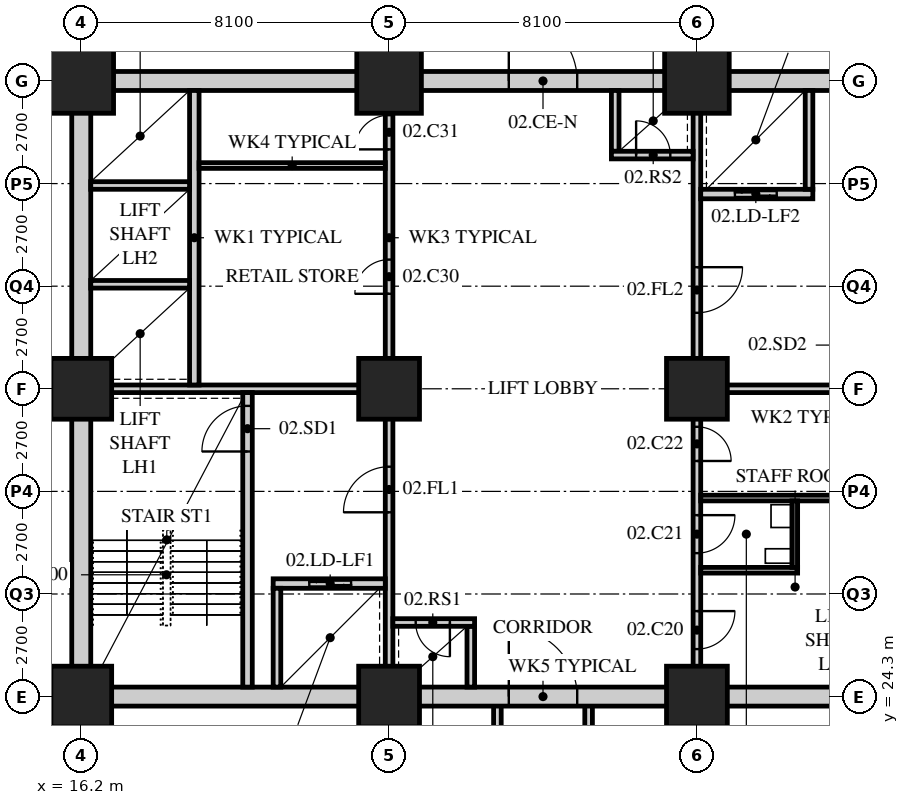
"""IFC4 building model, lengths in metres.
Left out: names, types, materials, properties, quantities, classifications, styles, units other than length and angle.
Written with IfcOpenShell. Run it as: python <this file> out.ifc"""

import sys

from ifc_helpers import new_model, si_unit, direction, frame, frame_2d, origin, origin_2d, place, context, subcontext, project, spatial, rectangle, hollow_rectangle, extrude, element, fill, save


model = new_model("IFC4")
c1 = context("Model", 3, precision=1e-05, world=origin(), true_north=direction((0.0, 1.0)))
c2 = subcontext(c1, "Body", "Model", "MODEL_VIEW")
j1 = project(units=[si_unit("LENGTHUNIT", "METRE"), si_unit("PLANEANGLEUNIT", "RADIAN")], contexts=[c1])
p1 = place(None, origin())
s1 = spatial("IfcSite", under=j1, at=p1, CompositionType="ELEMENT")
p2 = place(p1, origin())
s2 = spatial("IfcBuilding", under=s1, at=p2, CompositionType="ELEMENT")
p3 = place(p2, frame((0.0, 0.0, 11.4)))
s3 = spatial("IfcBuildingStorey", under=s2, at=p3, CompositionType="ELEMENT", Elevation=11.4)
for number, where, z_axis, x_axis in (
    (1, (16.2, 24.3, 0.0), (0.0, 0.0, 1.0), (1.0, 0.0, 0.0)),
    (2, (16.2, 32.4, 0.0), (0.0, 0.0, 1.0), (1.0, 0.0, 0.0)),
):
    element("IfcColumn", number, at=place(p3, frame(where, z_axis=z_axis, x_axis=x_axis)), inside=s3, PredefinedType="COLUMN", context=c2, shape_type="SweptSolid", body=[
        extrude(hollow_rectangle(XDim=1.6, YDim=1.6, WallThickness=0.15, at=origin_2d()), origin(), (0.0, 0.0, 1.0), 5.4),
    ])
p4 = place(p3, frame((16.2, 40.5, 0.0), z_axis=(0.0, 0.0, 1.0), x_axis=(1.0, 0.0, 0.0)))
e3 = element("IfcColumn", 3, at=p4, inside=s3, PredefinedType="COLUMN", context=c2, shape_type="SweptSolid", body=[
    extrude(hollow_rectangle(XDim=1.7, YDim=1.7, WallThickness=0.16, at=origin_2d()), origin(), (0.0, 0.0, 1.0), 5.4),
])
for number, where, z_axis, x_axis in (
    (4, (24.3, 24.3, 0.0), (0.0, 0.0, 1.0), (1.0, 0.0, 0.0)),
    (5, (24.3, 32.4, 0.0), (0.0, 0.0, 1.0), (1.0, 0.0, 0.0)),
):
    element("IfcColumn", number, at=place(p3, frame(where, z_axis=z_axis, x_axis=x_axis)), inside=s3, PredefinedType="COLUMN", context=c2, shape_type="SweptSolid", body=[
        extrude(hollow_rectangle(XDim=1.6, YDim=1.6, WallThickness=0.15, at=origin_2d()), origin(), (0.0, 0.0, 1.0), 5.4),
    ])
p5 = place(p3, frame((24.3, 40.5, 0.0), z_axis=(0.0, 0.0, 1.0), x_axis=(1.0, 0.0, 0.0)))
e6 = element("IfcColumn", 6, at=p5, inside=s3, PredefinedType="COLUMN", context=c2, shape_type="SweptSolid", body=[
    extrude(hollow_rectangle(XDim=1.7, YDim=1.7, WallThickness=0.16, at=origin_2d()), origin(), (0.0, 0.0, 1.0), 5.4),
])
for number, where, z_axis, x_axis in (
    (7, (32.4, 24.3, 0.0), (0.0, 0.0, 1.0), (1.0, 0.0, 0.0)),
    (8, (32.4, 32.4, 0.0), (0.0, 0.0, 1.0), (1.0, 0.0, 0.0)),
):
    element("IfcColumn", number, at=place(p3, frame(where, z_axis=z_axis, x_axis=x_axis)), inside=s3, PredefinedType="COLUMN", context=c2, shape_type="SweptSolid", body=[
        extrude(hollow_rectangle(XDim=1.6, YDim=1.6, WallThickness=0.15, at=origin_2d()), origin(), (0.0, 0.0, 1.0), 5.4),
    ])
p6 = place(p3, frame((32.4, 40.5, 0.0), z_axis=(0.0, 0.0, 1.0), x_axis=(1.0, 0.0, 0.0)))
e9 = element("IfcColumn", 9, at=p6, inside=s3, PredefinedType="COLUMN", context=c2, shape_type="SweptSolid", body=[
    extrude(hollow_rectangle(XDim=1.7, YDim=1.7, WallThickness=0.16, at=origin_2d()), origin(), (0.0, 0.0, 1.0), 5.4),
])
p7 = place(p3, frame((16.0, 40.5, 0.0), z_axis=(0.0, 0.0, 1.0), x_axis=(-1.0, 0.0, 0.0)))
e10 = element("IfcWall", 10, at=p7, inside=s3, PredefinedType="PARTITIONING", context=c2, shape_type="SweptSolid", body=[
    extrude(rectangle(XDim=12.4, YDim=0.15, at=frame_2d((6.2, 0.0))), origin(), (0.0, 0.0, 1.0), 4.538),
])
p8 = place(p3, frame((3.6, 32.4, 0.0), z_axis=(0.0, 0.0, 1.0), x_axis=(1.0, 0.0, 0.0)))
e11 = element("IfcWall", 11, at=p8, inside=s3, PredefinedType="SOLIDWALL", context=c2, shape_type="SweptSolid", body=[
    extrude(rectangle(XDim=12.6, YDim=0.2, at=frame_2d((6.3, 0.0))), origin(), (0.0, 0.0, 1.0), 4.538),
])
for number, where, z_axis, x_axis in (
    (12, (27.15, 11.7, 0.0), (0.0, 0.0, 1.0), (0.0, 1.0, 0.0)),
    (13, (29.55, 11.7, 0.0), (0.0, 0.0, 1.0), (0.0, 1.0, 0.0)),
):
    element("IfcWall", number, at=place(p3, frame(where, z_axis=z_axis, x_axis=x_axis)), inside=s3, PredefinedType="SOLIDWALL", context=c2, shape_type="SweptSolid", body=[
        extrude(rectangle(XDim=12.6, YDim=0.2, at=frame_2d((6.3, 0.0))), origin(), (0.0, 0.0, 1.0), 5.15),
    ])
p9 = place(p3, frame((3.6, 24.35, 0.0), z_axis=(0.0, 0.0, 1.0), x_axis=(1.0, 0.0, 0.0)))
e14 = element("IfcWall", 14, at=p9, inside=s3, PredefinedType="SOLIDWALL", context=c2, shape_type="SweptSolid", body=[
    extrude(rectangle(XDim=12.6, YDim=0.2, at=frame_2d((6.3, 0.0))), origin(), (0.0, 0.0, 1.0), 4.538),
])
p10 = place(p3, frame((15.95, 24.3, 0.0), z_axis=(0.0, 0.0, 1.0), x_axis=(1.0, 0.0, 0.0)))
e15 = element("IfcWall", 15, at=p10, inside=s3, PredefinedType="SOLIDWALL", context=c2, shape_type="SweptSolid", body=[
    extrude(rectangle(XDim=24.8, YDim=0.5, at=frame_2d((12.4, 0.0))), origin(), (0.0, 0.0, 1.0), 4.5),
])
p11 = place(p10, frame((11.5, 0.0, 0.0)))
e16 = element("IfcOpeningElement", 16, at=p11, cuts=e15, PredefinedType="OPENING", context=c2, shape_type="SweptSolid", body=[
    extrude(rectangle(XDim=1.8, YDim=2.4, at=frame_2d((0.9, 1.2))), frame((0.0, 0.26, 0.0), z_axis=(0.0, -1.0, 0.0), x_axis=(1.0, 0.0, 0.0)), (0.0, 0.0, 1.0), 0.52),
])
p12 = place(p3, frame((15.95, 40.5, 0.0), z_axis=(0.0, 0.0, 1.0), x_axis=(1.0, 0.0, 0.0)))
e17 = element("IfcWall", 17, at=p12, inside=s3, PredefinedType="SOLIDWALL", context=c2, shape_type="SweptSolid", body=[
    extrude(rectangle(XDim=24.8, YDim=0.5, at=frame_2d((12.4, 0.0))), origin(), (0.0, 0.0, 1.0), 4.5),
])
p13 = place(p12, frame((11.5, 0.0, 0.0)))
e18 = element("IfcOpeningElement", 18, at=p13, cuts=e17, PredefinedType="OPENING", context=c2, shape_type="SweptSolid", body=[
    extrude(rectangle(XDim=1.8, YDim=2.4, at=frame_2d((0.9, 1.2))), frame((0.0, 0.26, 0.0), z_axis=(0.0, -1.0, 0.0), x_axis=(1.0, 0.0, 0.0)), (0.0, 0.0, 1.0), 0.52),
])
p14 = place(p3, frame((16.2, 24.55, 0.0), z_axis=(0.0, 0.0, 1.0), x_axis=(0.0, 1.0, 0.0)))
e19 = element("IfcWall", 19, at=p14, inside=s3, PredefinedType="SOLIDWALL", context=c2, shape_type="SweptSolid", body=[
    extrude(rectangle(XDim=15.7, YDim=0.5, at=frame_2d((7.85, 0.0))), origin(), (0.0, 0.0, 1.0), 4.538),
])
p15 = place(p3, frame((16.45, 32.4, 0.0), z_axis=(0.0, 0.0, 1.0), x_axis=(1.0, 0.0, 0.0)))
e20 = element("IfcWall", 20, at=p15, inside=s3, PredefinedType="SOLIDWALL", context=c2, shape_type="SweptSolid", body=[
    extrude(rectangle(XDim=7.95, YDim=0.2, at=frame_2d((3.975, 0.0))), origin(), (0.0, 0.0, 1.0), 4.45),
])
p16 = place(p3, frame((24.3, 24.55, 0.0), z_axis=(0.0, 0.0, 1.0), x_axis=(0.0, 1.0, 0.0)))
e21 = element("IfcWall", 21, at=p16, inside=s3, PredefinedType="SOLIDWALL", context=c2, shape_type="SweptSolid", body=[
    extrude(rectangle(XDim=7.75, YDim=0.2, at=frame_2d((3.875, 0.0))), origin(), (0.0, 0.0, 1.0), 4.45),
])
p17 = place(p16, frame((4.6, 0.0, 0.0)))
e22 = element("IfcOpeningElement", 22, at=p17, cuts=e21, PredefinedType="OPENING", context=c2, shape_type="SweptSolid", body=[
    extrude(rectangle(XDim=1.2, YDim=2.1, at=frame_2d((0.6, 1.05))), frame((0.0, 0.11, 0.0), z_axis=(0.0, -1.0, 0.0), x_axis=(1.0, 0.0, 0.0)), (0.0, 0.0, 1.0), 0.22),
])
p18 = place(p3, frame((20.575, 24.55, 0.0), z_axis=(0.0, 0.0, 1.0), x_axis=(0.0, 1.0, 0.0)))
e23 = element("IfcWall", 23, at=p18, inside=s3, PredefinedType="SOLIDWALL", context=c2, shape_type="SweptSolid", body=[
    extrude(rectangle(XDim=7.75, YDim=0.25, at=frame_2d((3.875, 0.0))), origin(), (0.0, 0.0, 1.0), 5.15),
])
p19 = place(p18, frame((6.2, 0.0, 0.0)))
e24 = element("IfcOpeningElement", 24, at=p19, cuts=e23, PredefinedType="OPENING", context=c2, shape_type="SweptSolid", body=[
    extrude(rectangle(XDim=1.2, YDim=2.1, at=frame_2d((0.6, 1.05))), frame((0.0, 0.135, 0.0), z_axis=(0.0, -1.0, 0.0), x_axis=(1.0, 0.0, 0.0)), (0.0, 0.0, 1.0), 0.27),
])
p20 = place(p3, frame((21.25, 27.275, 0.0), z_axis=(0.0, 0.0, 1.0), x_axis=(1.0, 0.0, 0.0)))
e25 = element("IfcWall", 25, at=p20, inside=s3, PredefinedType="SOLIDWALL", context=c2, shape_type="SweptSolid", body=[
    extrude(rectangle(XDim=2.95, YDim=0.25, at=frame_2d((1.475, 0.0))), origin(), (0.0, 0.0, 1.0), 5.15),
])
p21 = place(p20, frame((0.95, 0.0, 0.0)))
e26 = element("IfcOpeningElement", 26, at=p21, cuts=e25, PredefinedType="OPENING", context=c2, shape_type="SweptSolid", body=[
    extrude(rectangle(XDim=1.1, YDim=2.4, at=frame_2d((0.55, 1.2))), frame((0.0, 0.135, 0.0), z_axis=(0.0, -1.0, 0.0), x_axis=(1.0, 0.0, 0.0)), (0.0, 0.0, 1.0), 0.27),
])
p22 = place(p3, frame((21.35, 24.55, 0.0), z_axis=(0.0, 0.0, 1.0), x_axis=(0.0, 1.0, 0.0)))
e27 = element("IfcWall", 27, at=p22, inside=s3, PredefinedType="SOLIDWALL", context=c2, shape_type="SweptSolid", body=[
    extrude(rectangle(XDim=2.6, YDim=0.2, at=frame_2d((1.3, 0.0))), origin(), (0.0, 0.0, 1.0), 5.15),
])
p23 = place(p3, frame((19.175, 32.5, 0.0), z_axis=(0.0, 0.0, 1.0), x_axis=(0.0, 1.0, 0.0)))
e28 = element("IfcWall", 28, at=p23, inside=s3, PredefinedType="SOLIDWALL", context=c2, shape_type="SweptSolid", body=[
    extrude(rectangle(XDim=7.75, YDim=0.25, at=frame_2d((3.875, 0.0))), origin(), (0.0, 0.0, 1.0), 5.15),
])
for number, where, z_axis, x_axis in (
    (29, (16.45, 35.15, 0.0), (0.0, 0.0, 1.0), (1.0, 0.0, 0.0)),
    (30, (16.45, 37.75, 0.0), (0.0, 0.0, 1.0), (1.0, 0.0, 0.0)),
):
    element("IfcWall", number, at=place(p3, frame(where, z_axis=z_axis, x_axis=x_axis)), inside=s3, PredefinedType="SOLIDWALL", context=c2, shape_type="SweptSolid", body=[
        extrude(rectangle(XDim=2.6, YDim=0.2, at=frame_2d((1.3, 0.0))), origin(), (0.0, 0.0, 1.0), 5.15),
    ])
p24 = place(p3, frame((26.45, 24.55, 0.0), z_axis=(0.0, 0.0, 1.0), x_axis=(0.0, 1.0, 0.0)))
e31 = element("IfcWall", 31, at=p24, inside=s3, PredefinedType="SOLIDWALL", context=c2, shape_type="SweptSolid", body=[
    extrude(rectangle(XDim=1.6, YDim=0.2, at=frame_2d((0.8, 0.0))), origin(), (0.0, 0.0, 1.0), 5.15),
])
p25 = place(p3, frame((24.4, 26.25, 0.0), z_axis=(0.0, 0.0, 1.0), x_axis=(1.0, 0.0, 0.0)))
e32 = element("IfcWall", 32, at=p25, inside=s3, PredefinedType="SOLIDWALL", context=c2, shape_type="SweptSolid", body=[
    extrude(rectangle(XDim=2.15, YDim=0.2, at=frame_2d((1.075, 0.0))), origin(), (0.0, 0.0, 1.0), 5.15),
])
p26 = place(p25, frame((0.6, 0.0, 0.0)))
e33 = element("IfcOpeningElement", 33, at=p26, cuts=e32, PredefinedType="OPENING", context=c2, shape_type="SweptSolid", body=[
    extrude(rectangle(XDim=0.9, YDim=2.1, at=frame_2d((0.45, 1.05))), frame((0.0, 0.11, 0.0), z_axis=(0.0, -1.0, 0.0), x_axis=(1.0, 0.0, 0.0)), (0.0, 0.0, 1.0), 0.22),
])
p27 = place(p3, frame((32.3, 32.4, 0.0), z_axis=(0.0, 0.0, 1.0), x_axis=(1.0, 0.0, 0.0)))
e34 = element("IfcWall", 34, at=p27, inside=s3, PredefinedType="SOLIDWALL", context=c2, shape_type="SweptSolid", body=[
    extrude(rectangle(XDim=7.95, YDim=0.2, at=frame_2d((3.975, 0.0))), origin(), (0.0, 0.0, 1.0), 4.45),
])
p28 = place(p3, frame((32.4, 32.5, 0.0), z_axis=(0.0, 0.0, 1.0), x_axis=(0.0, 1.0, 0.0)))
e35 = element("IfcWall", 35, at=p28, inside=s3, PredefinedType="SOLIDWALL", context=c2, shape_type="SweptSolid", body=[
    extrude(rectangle(XDim=7.75, YDim=0.2, at=frame_2d((3.875, 0.0))), origin(), (0.0, 0.0, 1.0), 4.45),
])
p29 = place(p28, frame((1.9, 0.0, 0.0)))
e36 = element("IfcOpeningElement", 36, at=p29, cuts=e35, PredefinedType="OPENING", context=c2, shape_type="SweptSolid", body=[
    extrude(rectangle(XDim=1.2, YDim=2.1, at=frame_2d((0.6, 1.05))), frame((0.0, 0.11, 0.0), z_axis=(0.0, -1.0, 0.0), x_axis=(1.0, 0.0, 0.0)), (0.0, 0.0, 1.0), 0.22),
])
p30 = place(p3, frame((32.5, 37.525, 0.0), z_axis=(0.0, 0.0, 1.0), x_axis=(1.0, 0.0, 0.0)))
e37 = element("IfcWall", 37, at=p30, inside=s3, PredefinedType="SOLIDWALL", context=c2, shape_type="SweptSolid", body=[
    extrude(rectangle(XDim=2.95, YDim=0.25, at=frame_2d((1.475, 0.0))), origin(), (0.0, 0.0, 1.0), 5.15),
])
p31 = place(p30, frame((0.9, 0.0, 0.0)))
e38 = element("IfcOpeningElement", 38, at=p31, cuts=e37, PredefinedType="OPENING", context=c2, shape_type="SweptSolid", body=[
    extrude(rectangle(XDim=1.1, YDim=2.4, at=frame_2d((0.55, 1.2))), frame((0.0, 0.135, 0.0), z_axis=(0.0, -1.0, 0.0), x_axis=(1.0, 0.0, 0.0)), (0.0, 0.0, 1.0), 0.27),
])
p32 = place(p3, frame((35.35, 37.65, 0.0), z_axis=(0.0, 0.0, 1.0), x_axis=(0.0, 1.0, 0.0)))
e39 = element("IfcWall", 39, at=p32, inside=s3, PredefinedType="SOLIDWALL", context=c2, shape_type="SweptSolid", body=[
    extrude(rectangle(XDim=2.6, YDim=0.2, at=frame_2d((1.3, 0.0))), origin(), (0.0, 0.0, 1.0), 5.15),
])
p33 = place(p3, frame((30.25, 38.65, 0.0), z_axis=(0.0, 0.0, 1.0), x_axis=(0.0, 1.0, 0.0)))
e40 = element("IfcWall", 40, at=p33, inside=s3, PredefinedType="SOLIDWALL", context=c2, shape_type="SweptSolid", body=[
    extrude(rectangle(XDim=1.6, YDim=0.2, at=frame_2d((0.8, 0.0))), origin(), (0.0, 0.0, 1.0), 5.15),
])
p34 = place(p3, frame((30.15, 38.55, 0.0), z_axis=(0.0, 0.0, 1.0), x_axis=(1.0, 0.0, 0.0)))
e41 = element("IfcWall", 41, at=p34, inside=s3, PredefinedType="SOLIDWALL", context=c2, shape_type="SweptSolid", body=[
    extrude(rectangle(XDim=2.15, YDim=0.2, at=frame_2d((1.075, 0.0))), origin(), (0.0, 0.0, 1.0), 5.15),
])
p35 = place(p34, frame((0.65, 0.0, 0.0)))
e42 = element("IfcOpeningElement", 42, at=p35, cuts=e41, PredefinedType="OPENING", context=c2, shape_type="SweptSolid", body=[
    extrude(rectangle(XDim=0.9, YDim=2.1, at=frame_2d((0.45, 1.05))), frame((0.0, 0.11, 0.0), z_axis=(0.0, -1.0, 0.0), x_axis=(1.0, 0.0, 0.0)), (0.0, 0.0, 1.0), 0.22),
])
p36 = place(p3, frame((24.3, 32.5, 0.0), z_axis=(0.0, 0.0, 1.0), x_axis=(0.0, 1.0, 0.0)))
e43 = element("IfcWall", 43, at=p36, inside=s3, PredefinedType="PARTITIONING", context=c2, shape_type="SweptSolid", body=[
    extrude(rectangle(XDim=7.75, YDim=0.2, at=frame_2d((3.875, 0.0))), origin(), (0.0, 0.0, 1.0), 4.45),
])
p37 = place(p36, frame((2.4, 0.0, 0.0)))
e44 = element("IfcOpeningElement", 44, at=p37, cuts=e43, PredefinedType="OPENING", context=c2, shape_type="SweptSolid", body=[
    extrude(rectangle(XDim=0.9, YDim=2.1, at=frame_2d((0.45, 1.05))), frame((0.0, 0.11, 0.0), z_axis=(0.0, -1.0, 0.0), x_axis=(1.0, 0.0, 0.0)), (0.0, 0.0, 1.0), 0.22),
])
p38 = place(p36, frame((6.2, 0.0, 0.0)))
e45 = element("IfcOpeningElement", 45, at=p38, cuts=e43, PredefinedType="OPENING", context=c2, shape_type="SweptSolid", body=[
    extrude(rectangle(XDim=0.9, YDim=2.1, at=frame_2d((0.45, 1.05))), frame((0.0, 0.11, 0.0), z_axis=(0.0, -1.0, 0.0), x_axis=(1.0, 0.0, 0.0)), (0.0, 0.0, 1.0), 0.22),
])
p39 = place(p3, frame((19.3, 38.275, 0.0), z_axis=(0.0, 0.0, 1.0), x_axis=(1.0, 0.0, 0.0)))
e46 = element("IfcWall", 46, at=p39, inside=s3, PredefinedType="PARTITIONING", context=c2, shape_type="SweptSolid", body=[
    extrude(rectangle(XDim=4.9, YDim=0.15, at=frame_2d((2.45, 0.0))), origin(), (0.0, 0.0, 1.0), 5.15),
])
p40 = place(p3, frame((32.4, 24.55, 0.0), z_axis=(0.0, 0.0, 1.0), x_axis=(0.0, 1.0, 0.0)))
e47 = element("IfcWall", 47, at=p40, inside=s3, PredefinedType="PARTITIONING", context=c2, shape_type="SweptSolid", body=[
    extrude(rectangle(XDim=7.75, YDim=0.2, at=frame_2d((3.875, 0.0))), origin(), (0.0, 0.0, 1.0), 4.45),
])
p41 = place(p40, frame((1.0, 0.0, 0.0)))
e48 = element("IfcOpeningElement", 48, at=p41, cuts=e47, PredefinedType="OPENING", context=c2, shape_type="SweptSolid", body=[
    extrude(rectangle(XDim=1.0, YDim=2.1, at=frame_2d((0.5, 1.05))), frame((0.0, 0.11, 0.0), z_axis=(0.0, -1.0, 0.0), x_axis=(1.0, 0.0, 0.0)), (0.0, 0.0, 1.0), 0.22),
])
p42 = place(p40, frame((3.525, 0.0, 0.0)))
e49 = element("IfcOpeningElement", 49, at=p42, cuts=e47, PredefinedType="OPENING", context=c2, shape_type="SweptSolid", body=[
    extrude(rectangle(XDim=1.0, YDim=2.1, at=frame_2d((0.5, 1.05))), frame((0.0, 0.11, 0.0), z_axis=(0.0, -1.0, 0.0), x_axis=(1.0, 0.0, 0.0)), (0.0, 0.0, 1.0), 0.22),
])
p43 = place(p40, frame((5.95, 0.0, 0.0)))
e50 = element("IfcOpeningElement", 50, at=p43, cuts=e47, PredefinedType="OPENING", context=c2, shape_type="SweptSolid", body=[
    extrude(rectangle(XDim=0.9, YDim=2.1, at=frame_2d((0.45, 1.05))), frame((0.0, 0.11, 0.0), z_axis=(0.0, -1.0, 0.0), x_axis=(1.0, 0.0, 0.0)), (0.0, 0.0, 1.0), 0.22),
])
p44 = place(p3, frame((32.5, 27.625, 0.0), z_axis=(0.0, 0.0, 1.0), x_axis=(1.0, 0.0, 0.0)))
e51 = element("IfcWall", 51, at=p44, inside=s3, PredefinedType="PARTITIONING", context=c2, shape_type="SweptSolid", body=[
    extrude(rectangle(XDim=2.55, YDim=0.15, at=frame_2d((1.275, 0.0))), origin(), (0.0, 0.0, 1.0), 5.15),
])
p45 = place(p3, frame((32.5, 29.525, 0.0), z_axis=(0.0, 0.0, 1.0), x_axis=(1.0, 0.0, 0.0)))
e52 = element("IfcWall", 52, at=p45, inside=s3, PredefinedType="PARTITIONING", context=c2, shape_type="SweptSolid", body=[
    extrude(rectangle(XDim=4.9, YDim=0.15, at=frame_2d((2.45, 0.0))), origin(), (0.0, 0.0, 1.0), 5.15),
])
p46 = place(p3, frame((34.975, 27.7, 0.0), z_axis=(0.0, 0.0, 1.0), x_axis=(0.0, 1.0, 0.0)))
e53 = element("IfcWall", 53, at=p46, inside=s3, PredefinedType="PARTITIONING", context=c2, shape_type="SweptSolid", body=[
    extrude(rectangle(XDim=1.75, YDim=0.15, at=frame_2d((0.875, 0.0))), origin(), (0.0, 0.0, 1.0), 5.15),
])
p47 = place(p37, origin())
e54 = element("IfcDoor", 54, at=p47, inside=s3, OperationType="SINGLE_SWING_LEFT", PredefinedType="DOOR", context=c2, shape_type="SweptSolid", body=[
    extrude(rectangle(XDim=0.9, YDim=2.1, at=frame_2d((0.45, 1.05))), frame((0.0, 0.025, 0.0), z_axis=(0.0, -1.0, 0.0), x_axis=(1.0, 0.0, 0.0)), (0.0, 0.0, 1.0), 0.05),
])
fill(e44, e54)
p48 = place(p38, origin())
e55 = element("IfcDoor", 55, at=p48, inside=s3, OperationType="SINGLE_SWING_LEFT", PredefinedType="DOOR", context=c2, shape_type="SweptSolid", body=[
    extrude(rectangle(XDim=0.9, YDim=2.1, at=frame_2d((0.45, 1.05))), frame((0.0, 0.025, 0.0), z_axis=(0.0, -1.0, 0.0), x_axis=(1.0, 0.0, 0.0)), (0.0, 0.0, 1.0), 0.05),
])
fill(e45, e55)
p49 = place(p41, origin())
e56 = element("IfcDoor", 56, at=p49, inside=s3, OperationType="SINGLE_SWING_LEFT", PredefinedType="DOOR", context=c2, shape_type="SweptSolid", body=[
    extrude(rectangle(XDim=1.0, YDim=2.1, at=frame_2d((0.5, 1.05))), frame((0.0, 0.025, 0.0), z_axis=(0.0, -1.0, 0.0), x_axis=(1.0, 0.0, 0.0)), (0.0, 0.0, 1.0), 0.05),
])
fill(e48, e56)
p50 = place(p42, origin())
e57 = element("IfcDoor", 57, at=p50, inside=s3, OperationType="SINGLE_SWING_LEFT", PredefinedType="DOOR", context=c2, shape_type="SweptSolid", body=[
    extrude(rectangle(XDim=1.0, YDim=2.1, at=frame_2d((0.5, 1.05))), frame((0.0, 0.025, 0.0), z_axis=(0.0, -1.0, 0.0), x_axis=(1.0, 0.0, 0.0)), (0.0, 0.0, 1.0), 0.05),
])
fill(e49, e57)
p51 = place(p43, origin())
e58 = element("IfcDoor", 58, at=p51, inside=s3, OperationType="SINGLE_SWING_RIGHT", PredefinedType="DOOR", context=c2, shape_type="SweptSolid", body=[
    extrude(rectangle(XDim=0.9, YDim=2.1, at=frame_2d((0.45, 1.05))), frame((0.0, 0.025, 0.0), z_axis=(0.0, -1.0, 0.0), x_axis=(1.0, 0.0, 0.0)), (0.0, 0.0, 1.0), 0.05),
])
fill(e50, e58)
p52 = place(p19, origin())
e59 = element("IfcDoor", 59, at=p52, inside=s3, OperationType="SINGLE_SWING_LEFT", PredefinedType="DOOR", context=c2, shape_type="SweptSolid", body=[
    extrude(rectangle(XDim=1.2, YDim=2.1, at=frame_2d((0.6, 1.05))), frame((0.0, 0.025, 0.0), z_axis=(0.0, -1.0, 0.0), x_axis=(1.0, 0.0, 0.0)), (0.0, 0.0, 1.0), 0.05),
])
fill(e24, e59)
p53 = place(p17, origin())
e60 = element("IfcDoor", 60, at=p53, inside=s3, OperationType="SINGLE_SWING_LEFT", PredefinedType="DOOR", context=c2, shape_type="SweptSolid", body=[
    extrude(rectangle(XDim=1.2, YDim=2.1, at=frame_2d((0.6, 1.05))), frame((0.0, 0.025, 0.0), z_axis=(0.0, -1.0, 0.0), x_axis=(1.0, 0.0, 0.0)), (0.0, 0.0, 1.0), 0.05),
])
fill(e22, e60)
p54 = place(p26, origin())
e61 = element("IfcDoor", 61, at=p54, inside=s3, OperationType="SINGLE_SWING_LEFT", PredefinedType="DOOR", context=c2, shape_type="SweptSolid", body=[
    extrude(rectangle(XDim=0.9, YDim=2.1, at=frame_2d((0.45, 1.05))), frame((0.0, 0.025, 0.0), z_axis=(0.0, -1.0, 0.0), x_axis=(1.0, 0.0, 0.0)), (0.0, 0.0, 1.0), 0.05),
])
fill(e33, e61)
p55 = place(p29, origin())
e62 = element("IfcDoor", 62, at=p55, inside=s3, OperationType="SINGLE_SWING_LEFT", PredefinedType="DOOR", context=c2, shape_type="SweptSolid", body=[
    extrude(rectangle(XDim=1.2, YDim=2.1, at=frame_2d((0.6, 1.05))), frame((0.0, 0.025, 0.0), z_axis=(0.0, -1.0, 0.0), x_axis=(1.0, 0.0, 0.0)), (0.0, 0.0, 1.0), 0.05),
])
fill(e36, e62)
p56 = place(p35, origin())
e63 = element("IfcDoor", 63, at=p56, inside=s3, OperationType="SINGLE_SWING_LEFT", PredefinedType="DOOR", context=c2, shape_type="SweptSolid", body=[
    extrude(rectangle(XDim=0.9, YDim=2.1, at=frame_2d((0.45, 1.05))), frame((0.0, 0.025, 0.0), z_axis=(0.0, -1.0, 0.0), x_axis=(1.0, 0.0, 0.0)), (0.0, 0.0, 1.0), 0.05),
])
fill(e42, e63)
p57 = place(p21, origin())
e64 = element("IfcDoor", 64, at=p57, inside=s3, OperationType="DOUBLE_DOOR_SLIDING", PredefinedType="DOOR", context=c2, shape_type="SweptSolid", body=[
    extrude(rectangle(XDim=1.1, YDim=2.4, at=frame_2d((0.55, 1.2))), frame((0.0, 0.025, 0.0), z_axis=(0.0, -1.0, 0.0), x_axis=(1.0, 0.0, 0.0)), (0.0, 0.0, 1.0), 0.05),
])
fill(e26, e64)
p58 = place(p31, origin())
e65 = element("IfcDoor", 65, at=p58, inside=s3, OperationType="DOUBLE_DOOR_SLIDING", PredefinedType="DOOR", context=c2, shape_type="SweptSolid", body=[
    extrude(rectangle(XDim=1.1, YDim=2.4, at=frame_2d((0.55, 1.2))), frame((0.0, 0.025, 0.0), z_axis=(0.0, -1.0, 0.0), x_axis=(1.0, 0.0, 0.0)), (0.0, 0.0, 1.0), 0.05),
])
fill(e38, e65)
p59 = place(p11, origin())
e66 = element("IfcDoor", 66, at=p59, inside=s3, OperationType="DOUBLE_DOOR_SINGLE_SWING", PredefinedType="DOOR", context=c2, shape_type="SweptSolid", body=[
    extrude(rectangle(XDim=1.8, YDim=2.4, at=frame_2d((0.9, 1.2))), frame((0.0, 0.025, 0.0), z_axis=(0.0, -1.0, 0.0), x_axis=(1.0, 0.0, 0.0)), (0.0, 0.0, 1.0), 0.05),
])
fill(e16, e66)
p60 = place(p13, origin())
e67 = element("IfcDoor", 67, at=p60, inside=s3, OperationType="DOUBLE_DOOR_SINGLE_SWING", PredefinedType="DOOR", context=c2, shape_type="SweptSolid", body=[
    extrude(rectangle(XDim=1.8, YDim=2.4, at=frame_2d((0.9, 1.2))), frame((0.0, 0.025, 0.0), z_axis=(0.0, -1.0, 0.0), x_axis=(1.0, 0.0, 0.0)), (0.0, 0.0, 1.0), 0.05),
])
fill(e18, e67)
save(model, sys.argv[1])
